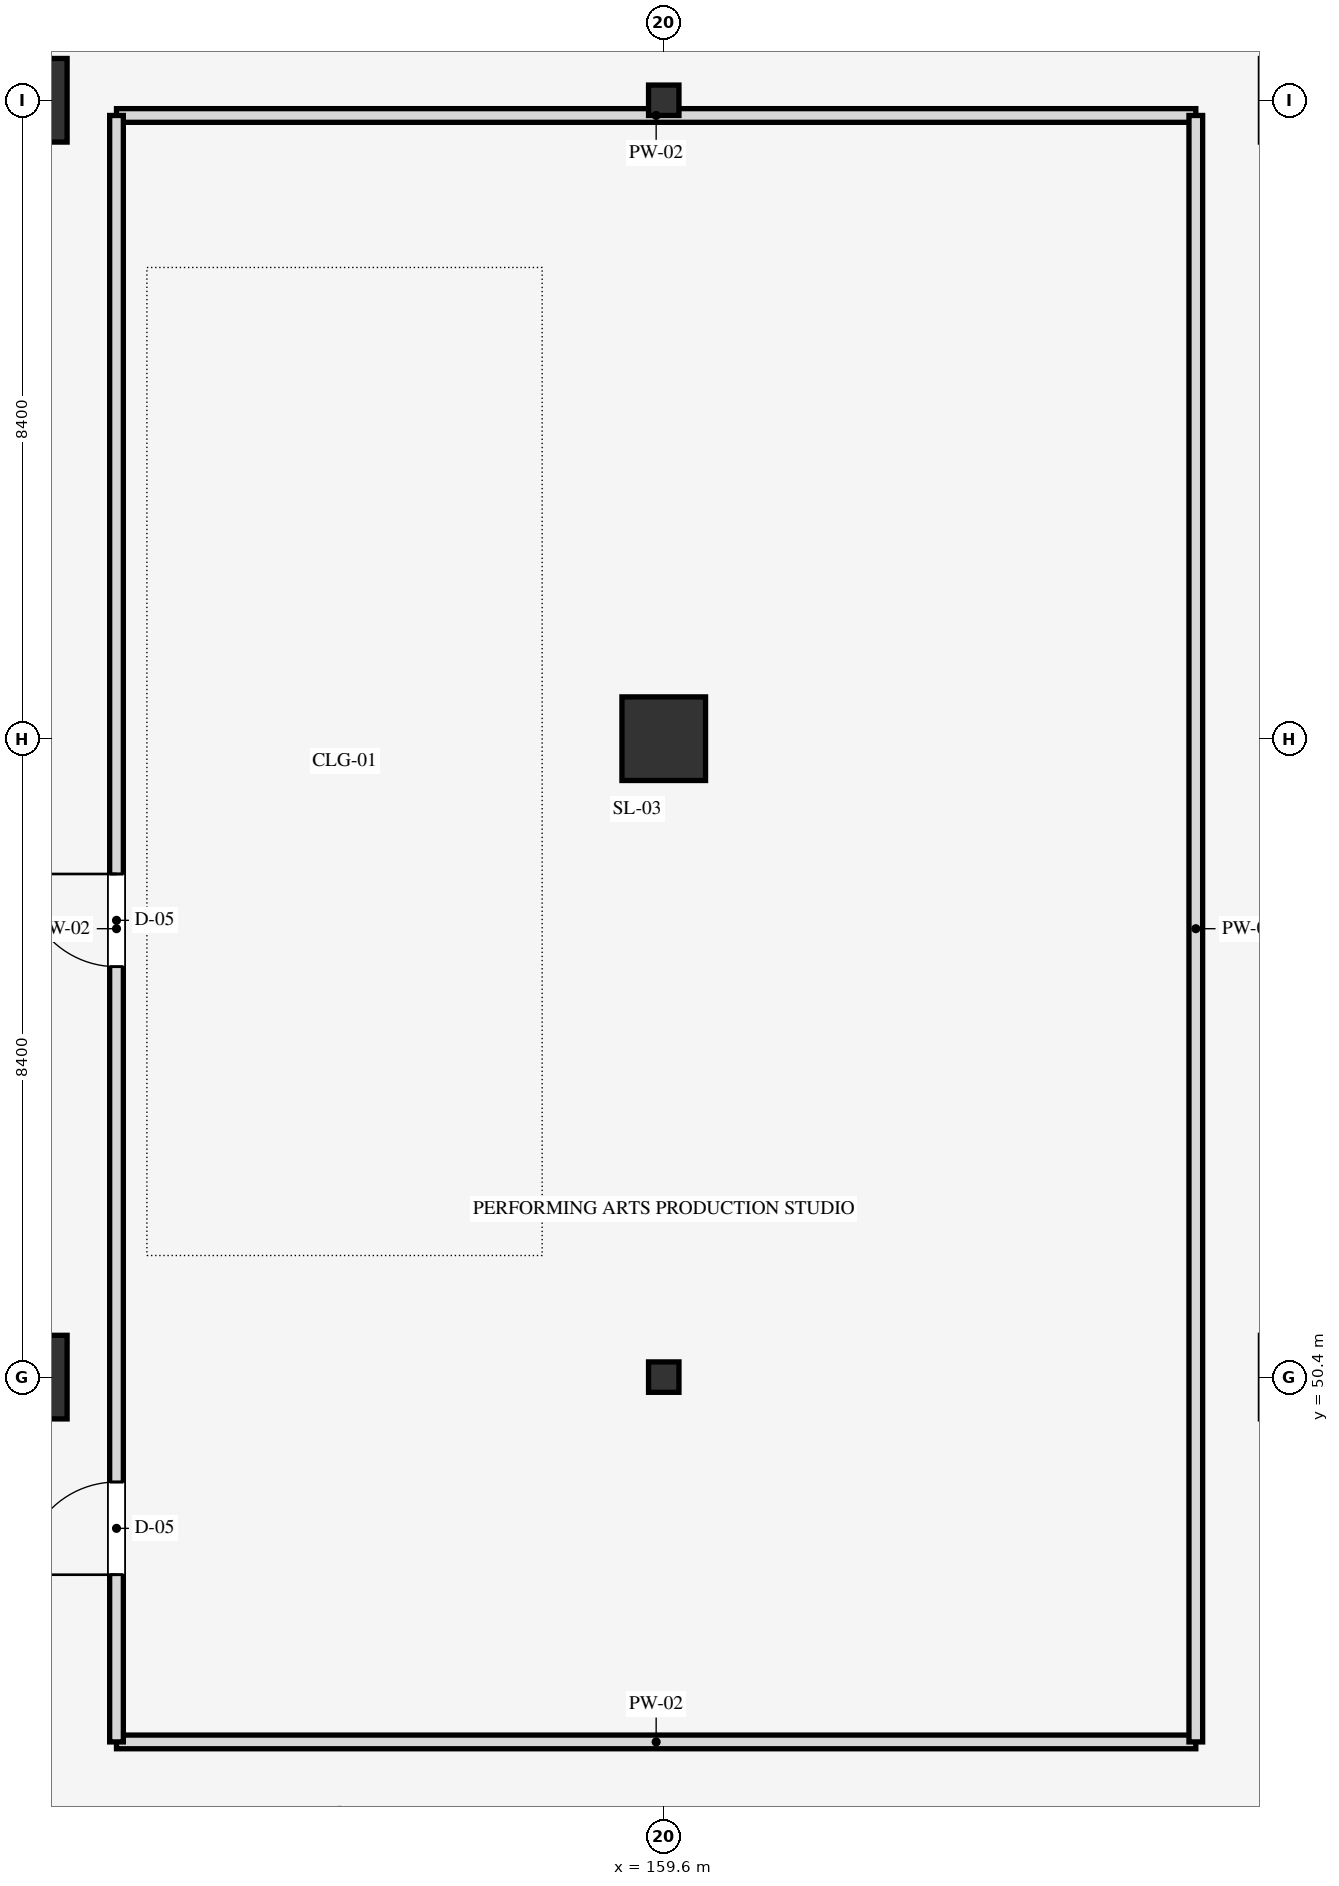
"""IFC4 building model, lengths in metres.
Left out: names, types, materials, properties, quantities, classifications, styles, units other than length and angle.
Written with IfcOpenShell. Run it as: python <this file> out.ifc"""

import sys

from ifc_helpers import new_model, si_unit, direction, frame, frame_2d, origin, origin_2d, place, context, subcontext, project, spatial, rectangle, i_section, extrude, element, fill, save


model = new_model("IFC4")
c1 = context("Model", 3, precision=1e-05, world=origin(), true_north=direction((0.0, 1.0)))
c2 = subcontext(c1, "Body", "Model", "MODEL_VIEW")
j1 = project(units=[si_unit("LENGTHUNIT", "METRE"), si_unit("PLANEANGLEUNIT", "RADIAN")], contexts=[c1])
p1 = place(None, origin())
s1 = spatial("IfcSite", under=j1, at=p1, CompositionType="ELEMENT")
p2 = place(p1, origin())
s2 = spatial("IfcBuilding", under=s1, at=p2, CompositionType="ELEMENT")
p3 = place(p2, frame((0.0, 0.0, 32.1)))
s3 = spatial("IfcBuildingStorey", under=s2, at=p3, CompositionType="ELEMENT", Elevation=32.1)
for number, where, z_axis, x_axis in (
    (1, (151.2, 50.4, 0.0), (0.0, 0.0, 1.0), (1.0, 0.0, 0.0)),
    (2, (151.2, 67.2, 0.0), (0.0, 0.0, 1.0), (1.0, 0.0, 0.0)),
):
    element("IfcColumn", number, at=place(p3, frame(where, z_axis=z_axis, x_axis=x_axis)), inside=s3, PredefinedType="COLUMN", context=c2, shape_type="SweptSolid", body=[
        extrude(rectangle(XDim=1.1, YDim=1.1, at=origin_2d()), origin(), (0.0, 0.0, 1.0), 4.2),
    ])
p4 = place(p3, frame((159.6, 50.4, 0.0), z_axis=(0.0, 0.0, 1.0), x_axis=(1.0, 0.0, 0.0)))
e3 = element("IfcColumn", 3, at=p4, inside=s3, PredefinedType="COLUMN", context=c2, shape_type="SweptSolid", body=[
    extrude(i_section(OverallWidth=0.4, OverallDepth=0.4, WebThickness=0.013, FlangeThickness=0.021, FilletRadius=0.022, at=origin_2d()), origin(), (0.0, 0.0, 1.0), 4.2),
])
p5 = place(p3, frame((159.6, 58.8, 0.0), z_axis=(0.0, 0.0, 1.0), x_axis=(1.0, 0.0, 0.0)))
e4 = element("IfcColumn", 4, at=p5, inside=s3, PredefinedType="COLUMN", context=c2, shape_type="SweptSolid", body=[
    extrude(rectangle(XDim=1.1, YDim=1.1, at=origin_2d()), origin(), (0.0, 0.0, 1.0), 4.2),
])
p6 = place(p3, frame((159.6, 67.2, 0.0), z_axis=(0.0, 0.0, 1.0), x_axis=(1.0, 0.0, 0.0)))
e5 = element("IfcColumn", 5, at=p6, inside=s3, PredefinedType="COLUMN", context=c2, shape_type="SweptSolid", body=[
    extrude(i_section(OverallWidth=0.4, OverallDepth=0.4, WebThickness=0.013, FlangeThickness=0.021, FilletRadius=0.022, at=origin_2d()), origin(), (0.0, 0.0, 1.0), 4.2),
])
for number, where, z_axis, x_axis in (
    (6, (152.4, 45.6, 0.0), (0.0, 0.0, 1.0), (1.0, 0.0, 0.0)),
    (7, (152.4, 67.0, 0.0), (0.0, 0.0, 1.0), (1.0, 0.0, 0.0)),
):
    element("IfcWall", number, at=place(p3, frame(where, z_axis=z_axis, x_axis=x_axis)), inside=s3, PredefinedType="PARTITIONING", context=c2, shape_type="SweptSolid", body=[
        extrude(rectangle(XDim=14.2, YDim=0.18, at=frame_2d((7.1, 0.0))), origin(), (0.0, 0.0, 1.0), 3.24),
    ])
p7 = place(p3, frame((152.4, 45.6, 0.0), z_axis=(0.0, 0.0, 1.0), x_axis=(0.0, 1.0, 0.0)))
e8 = element("IfcWall", 8, at=p7, inside=s3, PredefinedType="PARTITIONING", context=c2, shape_type="SweptSolid", body=[
    extrude(rectangle(XDim=21.4, YDim=0.18, at=frame_2d((10.7, 0.0))), origin(), (0.0, 0.0, 1.0), 3.24),
])
p8 = place(p7, frame((2.2, 0.0, 0.0)))
e9 = element("IfcOpeningElement", 9, at=p8, cuts=e8, PredefinedType="OPENING", context=c2, shape_type="SweptSolid", body=[
    extrude(rectangle(XDim=1.22, YDim=2.15, at=frame_2d((0.61, 1.075))), frame((0.0, 0.1, 0.0), z_axis=(0.0, -1.0, 0.0), x_axis=(1.0, 0.0, 0.0)), (0.0, 0.0, 1.0), 0.2),
])
p9 = place(p7, frame((10.2, 0.0, 0.0)))
e10 = element("IfcOpeningElement", 10, at=p9, cuts=e8, PredefinedType="OPENING", context=c2, shape_type="SweptSolid", body=[
    extrude(rectangle(XDim=1.22, YDim=2.15, at=frame_2d((0.61, 1.075))), frame((0.0, 0.1, 0.0), z_axis=(0.0, -1.0, 0.0), x_axis=(1.0, 0.0, 0.0)), (0.0, 0.0, 1.0), 0.2),
])
p10 = place(p3, frame((166.6, 45.6, 0.0), z_axis=(0.0, 0.0, 1.0), x_axis=(0.0, 1.0, 0.0)))
e11 = element("IfcWall", 11, at=p10, inside=s3, PredefinedType="PARTITIONING", context=c2, shape_type="SweptSolid", body=[
    extrude(rectangle(XDim=21.4, YDim=0.18, at=frame_2d((10.7, 0.0))), origin(), (0.0, 0.0, 1.0), 3.24),
])
p11 = place(p8, origin())
e12 = element("IfcDoor", 12, at=p11, inside=s3, OperationType="SINGLE_SWING_LEFT", PredefinedType="DOOR", context=c2, shape_type="SweptSolid", body=[
    extrude(rectangle(XDim=1.22, YDim=2.15, at=frame_2d((0.61, 1.075))), frame((0.0, 0.025, 0.0), z_axis=(0.0, -1.0, 0.0), x_axis=(1.0, 0.0, 0.0)), (0.0, 0.0, 1.0), 0.05),
])
fill(e9, e12)
p12 = place(p9, origin())
e13 = element("IfcDoor", 13, at=p12, inside=s3, OperationType="SINGLE_SWING_RIGHT", PredefinedType="DOOR", context=c2, shape_type="SweptSolid", body=[
    extrude(rectangle(XDim=1.22, YDim=2.15, at=frame_2d((0.61, 1.075))), frame((0.0, 0.025, 0.0), z_axis=(0.0, -1.0, 0.0), x_axis=(1.0, 0.0, 0.0)), (0.0, 0.0, 1.0), 0.05),
])
fill(e10, e13)
save(model, sys.argv[1])
